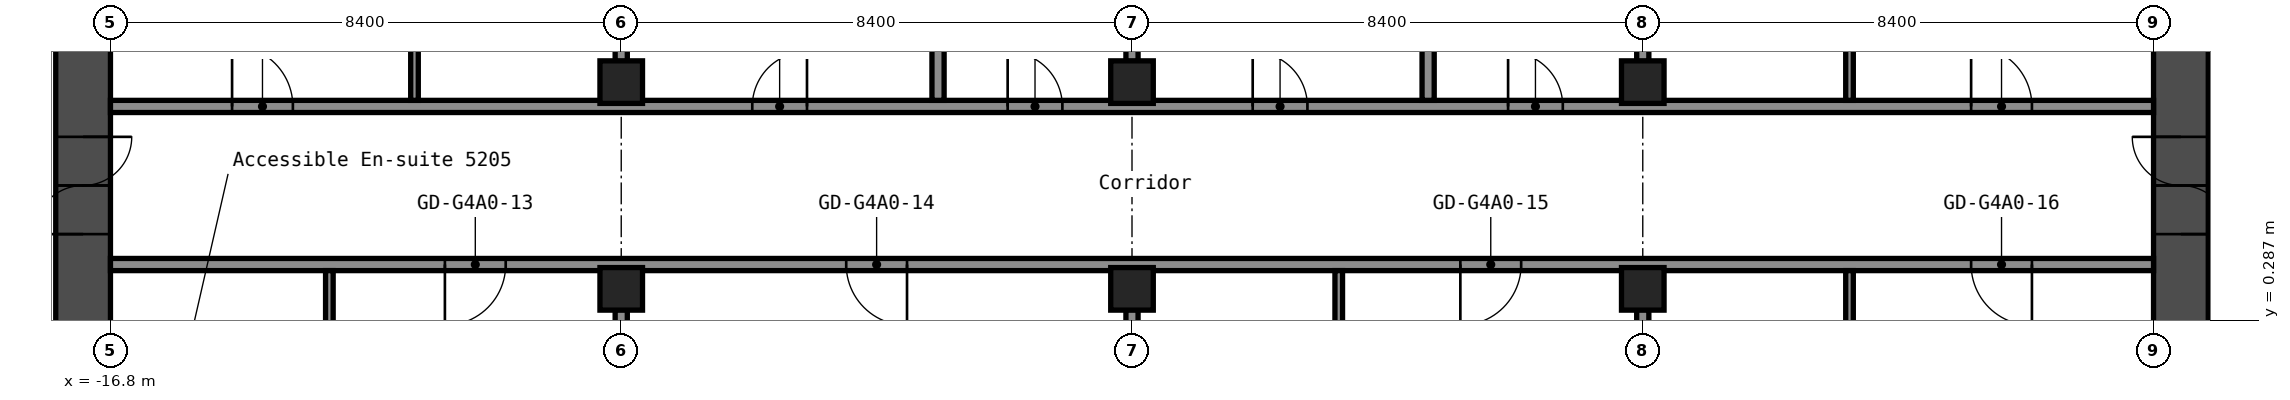
"""IFC4 building model, lengths in metres.
Left out: names, types, materials, properties, quantities, classifications, styles, units other than length and angle.
Written with IfcOpenShell. Run it as: python <this file> out.ifc"""

import sys

from ifc_helpers import new_model, si_unit, direction, frame, frame_2d, origin, origin_2d, place, context, subcontext, project, spatial, rectangle, hollow_rectangle, extrude, element, fill, save


model = new_model("IFC4")
c1 = context("Model", 3, precision=1e-05, world=origin(), true_north=direction((0.0, 1.0)))
c2 = subcontext(c1, "Body", "Model", "MODEL_VIEW")
j1 = project(units=[si_unit("LENGTHUNIT", "METRE"), si_unit("PLANEANGLEUNIT", "RADIAN")], contexts=[c1])
p1 = place(None, origin())
s1 = spatial("IfcSite", under=j1, at=p1, CompositionType="ELEMENT")
p2 = place(p1, origin())
s2 = spatial("IfcBuilding", under=s1, at=p2, CompositionType="ELEMENT")
p3 = place(p2, frame((0.0, 0.0, 186.6)))
s3 = spatial("IfcBuildingStorey", under=s2, at=p3, CompositionType="ELEMENT", Elevation=186.6)
for number, where, z_axis, x_axis in (
    (1, (-8.4, 0.8, 0.0), (0.0, 0.0, 1.0), (1.0, 0.0, 0.0)),
    (2, (-8.4, 4.2, 0.0), (0.0, 0.0, 1.0), (1.0, 0.0, 0.0)),
    (3, (0.0, 0.8, 0.0), (0.0, 0.0, 1.0), (1.0, 0.0, 0.0)),
    (4, (0.0, 4.2, 0.0), (0.0, 0.0, 1.0), (1.0, 0.0, 0.0)),
    (5, (8.4, 0.8, 0.0), (0.0, 0.0, 1.0), (1.0, 0.0, 0.0)),
    (6, (8.4, 4.2, 0.0), (0.0, 0.0, 1.0), (1.0, 0.0, 0.0)),
):
    element("IfcColumn", number, at=place(p3, frame(where, z_axis=z_axis, x_axis=x_axis)), inside=s3, PredefinedType="COLUMN", context=c2, shape_type="SweptSolid", body=[
        extrude(hollow_rectangle(XDim=0.7, YDim=0.7, WallThickness=0.028, at=origin_2d()), origin(), (0.0, 0.0, 1.0), 2.75),
    ])
p4 = place(p3, frame((-17.25, -8.4, 0.0), z_axis=(0.0, 0.0, 1.0), x_axis=(0.0, 1.0, 0.0)))
e7 = element("IfcWall", 7, at=p4, inside=s3, PredefinedType="SHEAR", context=c2, shape_type="SweptSolid", body=[
    extrude(rectangle(XDim=16.8, YDim=0.9, at=frame_2d((8.4, 0.0))), origin(), (0.0, 0.0, 1.0), 2.75),
])
p5 = place(p4, frame((10.1, 0.0, 0.0)))
e8 = element("IfcOpeningElement", 8, at=p5, cuts=e7, PredefinedType="OPENING", context=c2, shape_type="SweptSolid", body=[
    extrude(rectangle(XDim=1.6, YDim=2.1, at=frame_2d((0.8, 1.05))), frame((0.0, 0.46, 0.0), z_axis=(0.0, -1.0, 0.0), x_axis=(1.0, 0.0, 0.0)), (0.0, 0.0, 1.0), 0.92),
])
p6 = place(p3, frame((17.25, -8.4, 0.0), z_axis=(0.0, 0.0, 1.0), x_axis=(0.0, 1.0, 0.0)))
e9 = element("IfcWall", 9, at=p6, inside=s3, PredefinedType="SHEAR", context=c2, shape_type="SweptSolid", body=[
    extrude(rectangle(XDim=16.8, YDim=0.9, at=frame_2d((8.4, 0.0))), origin(), (0.0, 0.0, 1.0), 2.75),
])
p7 = place(p6, frame((10.1, 0.0, 0.0)))
e10 = element("IfcOpeningElement", 10, at=p7, cuts=e9, PredefinedType="OPENING", context=c2, shape_type="SweptSolid", body=[
    extrude(rectangle(XDim=1.6, YDim=2.1, at=frame_2d((0.8, 1.05))), frame((0.0, 0.46, 0.0), z_axis=(0.0, -1.0, 0.0), x_axis=(1.0, 0.0, 0.0)), (0.0, 0.0, 1.0), 0.92),
])
p8 = place(p3, frame((-16.8, 1.2, 0.0), z_axis=(0.0, 0.0, 1.0), x_axis=(1.0, 0.0, 0.0)))
e11 = element("IfcWall", 11, at=p8, inside=s3, PredefinedType="PARTITIONING", context=c2, shape_type="SweptSolid", body=[
    extrude(rectangle(XDim=33.6, YDim=0.2, at=frame_2d((16.8, 0.0))), origin(), (0.0, 0.0, 1.0), 2.75),
])
p9 = place(p8, frame((5.5, 0.0, 0.0)))
e12 = element("IfcOpeningElement", 12, at=p9, cuts=e11, PredefinedType="OPENING", context=c2, shape_type="SweptSolid", body=[
    extrude(rectangle(XDim=1.0, YDim=2.1, at=frame_2d((0.5, 1.05))), frame((0.0, 0.11, 0.0), z_axis=(0.0, -1.0, 0.0), x_axis=(1.0, 0.0, 0.0)), (0.0, 0.0, 1.0), 0.22),
])
p10 = place(p8, frame((12.1, 0.0, 0.0)))
e13 = element("IfcOpeningElement", 13, at=p10, cuts=e11, PredefinedType="OPENING", context=c2, shape_type="SweptSolid", body=[
    extrude(rectangle(XDim=1.0, YDim=2.1, at=frame_2d((0.5, 1.05))), frame((0.0, 0.11, 0.0), z_axis=(0.0, -1.0, 0.0), x_axis=(1.0, 0.0, 0.0)), (0.0, 0.0, 1.0), 0.22),
])
p11 = place(p8, frame((22.2, 0.0, 0.0)))
e14 = element("IfcOpeningElement", 14, at=p11, cuts=e11, PredefinedType="OPENING", context=c2, shape_type="SweptSolid", body=[
    extrude(rectangle(XDim=1.0, YDim=2.1, at=frame_2d((0.5, 1.05))), frame((0.0, 0.11, 0.0), z_axis=(0.0, -1.0, 0.0), x_axis=(1.0, 0.0, 0.0)), (0.0, 0.0, 1.0), 0.22),
])
p12 = place(p8, frame((30.6, 0.0, 0.0)))
e15 = element("IfcOpeningElement", 15, at=p12, cuts=e11, PredefinedType="OPENING", context=c2, shape_type="SweptSolid", body=[
    extrude(rectangle(XDim=1.0, YDim=2.1, at=frame_2d((0.5, 1.05))), frame((0.0, 0.11, 0.0), z_axis=(0.0, -1.0, 0.0), x_axis=(1.0, 0.0, 0.0)), (0.0, 0.0, 1.0), 0.22),
])
p13 = place(p3, frame((-16.8, 3.8, 0.0), z_axis=(0.0, 0.0, 1.0), x_axis=(1.0, 0.0, 0.0)))
e16 = element("IfcWall", 16, at=p13, inside=s3, PredefinedType="PARTITIONING", context=c2, shape_type="SweptSolid", body=[
    extrude(rectangle(XDim=33.6, YDim=0.2, at=frame_2d((16.8, 0.0))), origin(), (0.0, 0.0, 1.0), 2.75),
])
p14 = place(p13, frame((2.0, 0.0, 0.0)))
e17 = element("IfcOpeningElement", 17, at=p14, cuts=e16, PredefinedType="OPENING", context=c2, shape_type="SweptSolid", body=[
    extrude(rectangle(XDim=1.0, YDim=2.1, at=frame_2d((0.5, 1.05))), frame((0.0, 0.11, 0.0), z_axis=(0.0, -1.0, 0.0), x_axis=(1.0, 0.0, 0.0)), (0.0, 0.0, 1.0), 0.22),
])
p15 = place(p13, frame((10.555, 0.0, 0.0)))
e18 = element("IfcOpeningElement", 18, at=p15, cuts=e16, PredefinedType="OPENING", context=c2, shape_type="SweptSolid", body=[
    extrude(rectangle(XDim=0.9, YDim=2.1, at=frame_2d((0.45, 1.05))), frame((0.0, 0.11, 0.0), z_axis=(0.0, -1.0, 0.0), x_axis=(1.0, 0.0, 0.0)), (0.0, 0.0, 1.0), 0.22),
])
p16 = place(p13, frame((14.755, 0.0, 0.0)))
e19 = element("IfcOpeningElement", 19, at=p16, cuts=e16, PredefinedType="OPENING", context=c2, shape_type="SweptSolid", body=[
    extrude(rectangle(XDim=0.9, YDim=2.1, at=frame_2d((0.45, 1.05))), frame((0.0, 0.11, 0.0), z_axis=(0.0, -1.0, 0.0), x_axis=(1.0, 0.0, 0.0)), (0.0, 0.0, 1.0), 0.22),
])
p17 = place(p13, frame((18.785, 0.0, 0.0)))
e20 = element("IfcOpeningElement", 20, at=p17, cuts=e16, PredefinedType="OPENING", context=c2, shape_type="SweptSolid", body=[
    extrude(rectangle(XDim=0.9, YDim=2.1, at=frame_2d((0.45, 1.05))), frame((0.0, 0.11, 0.0), z_axis=(0.0, -1.0, 0.0), x_axis=(1.0, 0.0, 0.0)), (0.0, 0.0, 1.0), 0.22),
])
p18 = place(p13, frame((22.985, 0.0, 0.0)))
e21 = element("IfcOpeningElement", 21, at=p18, cuts=e16, PredefinedType="OPENING", context=c2, shape_type="SweptSolid", body=[
    extrude(rectangle(XDim=0.9, YDim=2.1, at=frame_2d((0.45, 1.05))), frame((0.0, 0.11, 0.0), z_axis=(0.0, -1.0, 0.0), x_axis=(1.0, 0.0, 0.0)), (0.0, 0.0, 1.0), 0.22),
])
p19 = place(p13, frame((30.6, 0.0, 0.0)))
e22 = element("IfcOpeningElement", 22, at=p19, cuts=e16, PredefinedType="OPENING", context=c2, shape_type="SweptSolid", body=[
    extrude(rectangle(XDim=1.0, YDim=2.1, at=frame_2d((0.5, 1.05))), frame((0.0, 0.11, 0.0), z_axis=(0.0, -1.0, 0.0), x_axis=(1.0, 0.0, 0.0)), (0.0, 0.0, 1.0), 0.22),
])
p20 = place(p3, frame((-13.2, -2.2, 0.0), z_axis=(0.0, 0.0, 1.0), x_axis=(0.0, 1.0, 0.0)))
e23 = element("IfcWall", 23, at=p20, inside=s3, PredefinedType="PARTITIONING", context=c2, shape_type="SweptSolid", body=[
    extrude(rectangle(XDim=3.3, YDim=0.125, at=frame_2d((1.65, 0.0))), origin(), (0.0, 0.0, 1.0), 2.75),
])
p21 = place(p20, frame((1.2, 0.0, 0.0)))
e24 = element("IfcOpeningElement", 24, at=p21, cuts=e23, PredefinedType="OPENING", context=c2, shape_type="SweptSolid", body=[
    extrude(rectangle(XDim=1.0, YDim=2.1, at=frame_2d((0.5, 1.05))), frame((0.0, 0.073, 0.0), z_axis=(0.0, -1.0, 0.0), x_axis=(1.0, 0.0, 0.0)), (0.0, 0.0, 1.0), 0.145),
])
p22 = place(p3, frame((-11.8, 3.9, 0.0), z_axis=(0.0, 0.0, 1.0), x_axis=(0.0, 1.0, 0.0)))
e25 = element("IfcWall", 25, at=p22, inside=s3, PredefinedType="PARTITIONING", context=c2, shape_type="SweptSolid", body=[
    extrude(rectangle(XDim=3.3, YDim=0.125, at=frame_2d((1.65, 0.0))), origin(), (0.0, 0.0, 1.0), 2.75),
])
for number, where, z_axis, x_axis in (
    (26, (-8.4, -15.55, 0.0), (0.0, 0.0, 1.0), (0.0, 1.0, 0.0)),
    (27, (-8.4, 4.54, 0.0), (0.0, 0.0, 1.0), (0.0, 1.0, 0.0)),
):
    element("IfcWall", number, at=place(p3, frame(where, z_axis=z_axis, x_axis=x_axis)), inside=s3, PredefinedType="PARTITIONING", context=c2, shape_type="SweptSolid", body=[
        extrude(rectangle(XDim=16.01, YDim=0.2, at=frame_2d((8.005, 0.0))), origin(), (0.0, 0.0, 1.0), 2.75),
    ])
p23 = place(p3, frame((-3.19, 3.9, 0.0), z_axis=(0.0, 0.0, 1.0), x_axis=(0.0, 1.0, 0.0)))
e28 = element("IfcWall", 28, at=p23, inside=s3, PredefinedType="PARTITIONING", context=c2, shape_type="SweptSolid", body=[
    extrude(rectangle(XDim=16.65, YDim=0.2, at=frame_2d((8.325, 0.0))), origin(), (0.0, 0.0, 1.0), 2.75),
])
for number, where, z_axis, x_axis in (
    (29, (0.0, -15.55, 0.0), (0.0, 0.0, 1.0), (0.0, 1.0, 0.0)),
    (30, (0.0, 4.54, 0.0), (0.0, 0.0, 1.0), (0.0, 1.0, 0.0)),
):
    element("IfcWall", number, at=place(p3, frame(where, z_axis=z_axis, x_axis=x_axis)), inside=s3, PredefinedType="PARTITIONING", context=c2, shape_type="SweptSolid", body=[
        extrude(rectangle(XDim=16.01, YDim=0.2, at=frame_2d((8.005, 0.0))), origin(), (0.0, 0.0, 1.0), 2.75),
    ])
p24 = place(p3, frame((3.4, -2.2, 0.0), z_axis=(0.0, 0.0, 1.0), x_axis=(0.0, 1.0, 0.0)))
e31 = element("IfcWall", 31, at=p24, inside=s3, PredefinedType="PARTITIONING", context=c2, shape_type="SweptSolid", body=[
    extrude(rectangle(XDim=3.3, YDim=0.125, at=frame_2d((1.65, 0.0))), origin(), (0.0, 0.0, 1.0), 2.75),
])
p25 = place(p3, frame((4.87, 3.9, 0.0), z_axis=(0.0, 0.0, 1.0), x_axis=(0.0, 1.0, 0.0)))
e32 = element("IfcWall", 32, at=p25, inside=s3, PredefinedType="PARTITIONING", context=c2, shape_type="SweptSolid", body=[
    extrude(rectangle(XDim=16.65, YDim=0.2, at=frame_2d((8.325, 0.0))), origin(), (0.0, 0.0, 1.0), 2.75),
])
for number, where, z_axis, x_axis in (
    (33, (8.4, -15.55, 0.0), (0.0, 0.0, 1.0), (0.0, 1.0, 0.0)),
    (34, (8.4, 4.54, 0.0), (0.0, 0.0, 1.0), (0.0, 1.0, 0.0)),
):
    element("IfcWall", number, at=place(p3, frame(where, z_axis=z_axis, x_axis=x_axis)), inside=s3, PredefinedType="PARTITIONING", context=c2, shape_type="SweptSolid", body=[
        extrude(rectangle(XDim=16.01, YDim=0.2, at=frame_2d((8.005, 0.0))), origin(), (0.0, 0.0, 1.0), 2.75),
    ])
for number, where, z_axis, x_axis in (
    (35, (11.8, -2.2, 0.0), (0.0, 0.0, 1.0), (0.0, 1.0, 0.0)),
    (36, (11.8, 3.9, 0.0), (0.0, 0.0, 1.0), (0.0, 1.0, 0.0)),
):
    element("IfcWall", number, at=place(p3, frame(where, z_axis=z_axis, x_axis=x_axis)), inside=s3, PredefinedType="PARTITIONING", context=c2, shape_type="SweptSolid", body=[
        extrude(rectangle(XDim=3.3, YDim=0.125, at=frame_2d((1.65, 0.0))), origin(), (0.0, 0.0, 1.0), 2.75),
    ])
p26 = place(p5, origin())
e37 = element("IfcDoor", 37, at=p26, inside=s3, OperationType="DOUBLE_DOOR_SINGLE_SWING", PredefinedType="DOOR", context=c2, shape_type="SweptSolid", body=[
    extrude(rectangle(XDim=1.6, YDim=2.1, at=frame_2d((0.8, 1.05))), frame((0.0, 0.025, 0.0), z_axis=(0.0, -1.0, 0.0), x_axis=(1.0, 0.0, 0.0)), (0.0, 0.0, 1.0), 0.05),
])
fill(e8, e37)
p27 = place(p7, origin())
e38 = element("IfcDoor", 38, at=p27, inside=s3, OperationType="DOUBLE_DOOR_SINGLE_SWING", PredefinedType="DOOR", context=c2, shape_type="SweptSolid", body=[
    extrude(rectangle(XDim=1.6, YDim=2.1, at=frame_2d((0.8, 1.05))), frame((0.0, 0.025, 0.0), z_axis=(0.0, -1.0, 0.0), x_axis=(1.0, 0.0, 0.0)), (0.0, 0.0, 1.0), 0.05),
])
fill(e10, e38)
p28 = place(p9, origin())
e39 = element("IfcDoor", 39, at=p28, inside=s3, OperationType="SINGLE_SWING_LEFT", PredefinedType="DOOR", context=c2, shape_type="SweptSolid", body=[
    extrude(rectangle(XDim=1.0, YDim=2.1, at=frame_2d((0.5, 1.05))), frame((0.0, 0.025, 0.0), z_axis=(0.0, -1.0, 0.0), x_axis=(1.0, 0.0, 0.0)), (0.0, 0.0, 1.0), 0.05),
])
fill(e12, e39)
p29 = place(p10, origin())
e40 = element("IfcDoor", 40, at=p29, inside=s3, OperationType="SINGLE_SWING_RIGHT", PredefinedType="DOOR", context=c2, shape_type="SweptSolid", body=[
    extrude(rectangle(XDim=1.0, YDim=2.1, at=frame_2d((0.5, 1.05))), frame((0.0, 0.025, 0.0), z_axis=(0.0, -1.0, 0.0), x_axis=(1.0, 0.0, 0.0)), (0.0, 0.0, 1.0), 0.05),
])
fill(e13, e40)
p30 = place(p11, origin())
e41 = element("IfcDoor", 41, at=p30, inside=s3, OperationType="SINGLE_SWING_LEFT", PredefinedType="DOOR", context=c2, shape_type="SweptSolid", body=[
    extrude(rectangle(XDim=1.0, YDim=2.1, at=frame_2d((0.5, 1.05))), frame((0.0, 0.025, 0.0), z_axis=(0.0, -1.0, 0.0), x_axis=(1.0, 0.0, 0.0)), (0.0, 0.0, 1.0), 0.05),
])
fill(e14, e41)
p31 = place(p12, origin())
e42 = element("IfcDoor", 42, at=p31, inside=s3, OperationType="SINGLE_SWING_RIGHT", PredefinedType="DOOR", context=c2, shape_type="SweptSolid", body=[
    extrude(rectangle(XDim=1.0, YDim=2.1, at=frame_2d((0.5, 1.05))), frame((0.0, 0.025, 0.0), z_axis=(0.0, -1.0, 0.0), x_axis=(1.0, 0.0, 0.0)), (0.0, 0.0, 1.0), 0.05),
])
fill(e15, e42)
p32 = place(p14, origin())
e43 = element("IfcDoor", 43, at=p32, inside=s3, OperationType="SINGLE_SWING_RIGHT", PredefinedType="DOOR", context=c2, shape_type="SweptSolid", body=[
    extrude(rectangle(XDim=1.0, YDim=2.1, at=frame_2d((0.5, 1.05))), frame((0.0, 0.025, 0.0), z_axis=(0.0, -1.0, 0.0), x_axis=(1.0, 0.0, 0.0)), (0.0, 0.0, 1.0), 0.05),
])
fill(e17, e43)
p33 = place(p15, origin())
e44 = element("IfcDoor", 44, at=p33, inside=s3, OperationType="SINGLE_SWING_LEFT", PredefinedType="DOOR", context=c2, shape_type="SweptSolid", body=[
    extrude(rectangle(XDim=0.9, YDim=2.1, at=frame_2d((0.45, 1.05))), frame((0.0, 0.025, 0.0), z_axis=(0.0, -1.0, 0.0), x_axis=(1.0, 0.0, 0.0)), (0.0, 0.0, 1.0), 0.05),
])
fill(e18, e44)
p34 = place(p16, origin())
e45 = element("IfcDoor", 45, at=p34, inside=s3, OperationType="SINGLE_SWING_RIGHT", PredefinedType="DOOR", context=c2, shape_type="SweptSolid", body=[
    extrude(rectangle(XDim=0.9, YDim=2.1, at=frame_2d((0.45, 1.05))), frame((0.0, 0.025, 0.0), z_axis=(0.0, -1.0, 0.0), x_axis=(1.0, 0.0, 0.0)), (0.0, 0.0, 1.0), 0.05),
])
fill(e19, e45)
p35 = place(p17, origin())
e46 = element("IfcDoor", 46, at=p35, inside=s3, OperationType="SINGLE_SWING_RIGHT", PredefinedType="DOOR", context=c2, shape_type="SweptSolid", body=[
    extrude(rectangle(XDim=0.9, YDim=2.1, at=frame_2d((0.45, 1.05))), frame((0.0, 0.025, 0.0), z_axis=(0.0, -1.0, 0.0), x_axis=(1.0, 0.0, 0.0)), (0.0, 0.0, 1.0), 0.05),
])
fill(e20, e46)
p36 = place(p18, origin())
e47 = element("IfcDoor", 47, at=p36, inside=s3, OperationType="SINGLE_SWING_RIGHT", PredefinedType="DOOR", context=c2, shape_type="SweptSolid", body=[
    extrude(rectangle(XDim=0.9, YDim=2.1, at=frame_2d((0.45, 1.05))), frame((0.0, 0.025, 0.0), z_axis=(0.0, -1.0, 0.0), x_axis=(1.0, 0.0, 0.0)), (0.0, 0.0, 1.0), 0.05),
])
fill(e21, e47)
p37 = place(p19, origin())
e48 = element("IfcDoor", 48, at=p37, inside=s3, OperationType="SINGLE_SWING_RIGHT", PredefinedType="DOOR", context=c2, shape_type="SweptSolid", body=[
    extrude(rectangle(XDim=1.0, YDim=2.1, at=frame_2d((0.5, 1.05))), frame((0.0, 0.025, 0.0), z_axis=(0.0, -1.0, 0.0), x_axis=(1.0, 0.0, 0.0)), (0.0, 0.0, 1.0), 0.05),
])
fill(e22, e48)
save(model, sys.argv[1])
